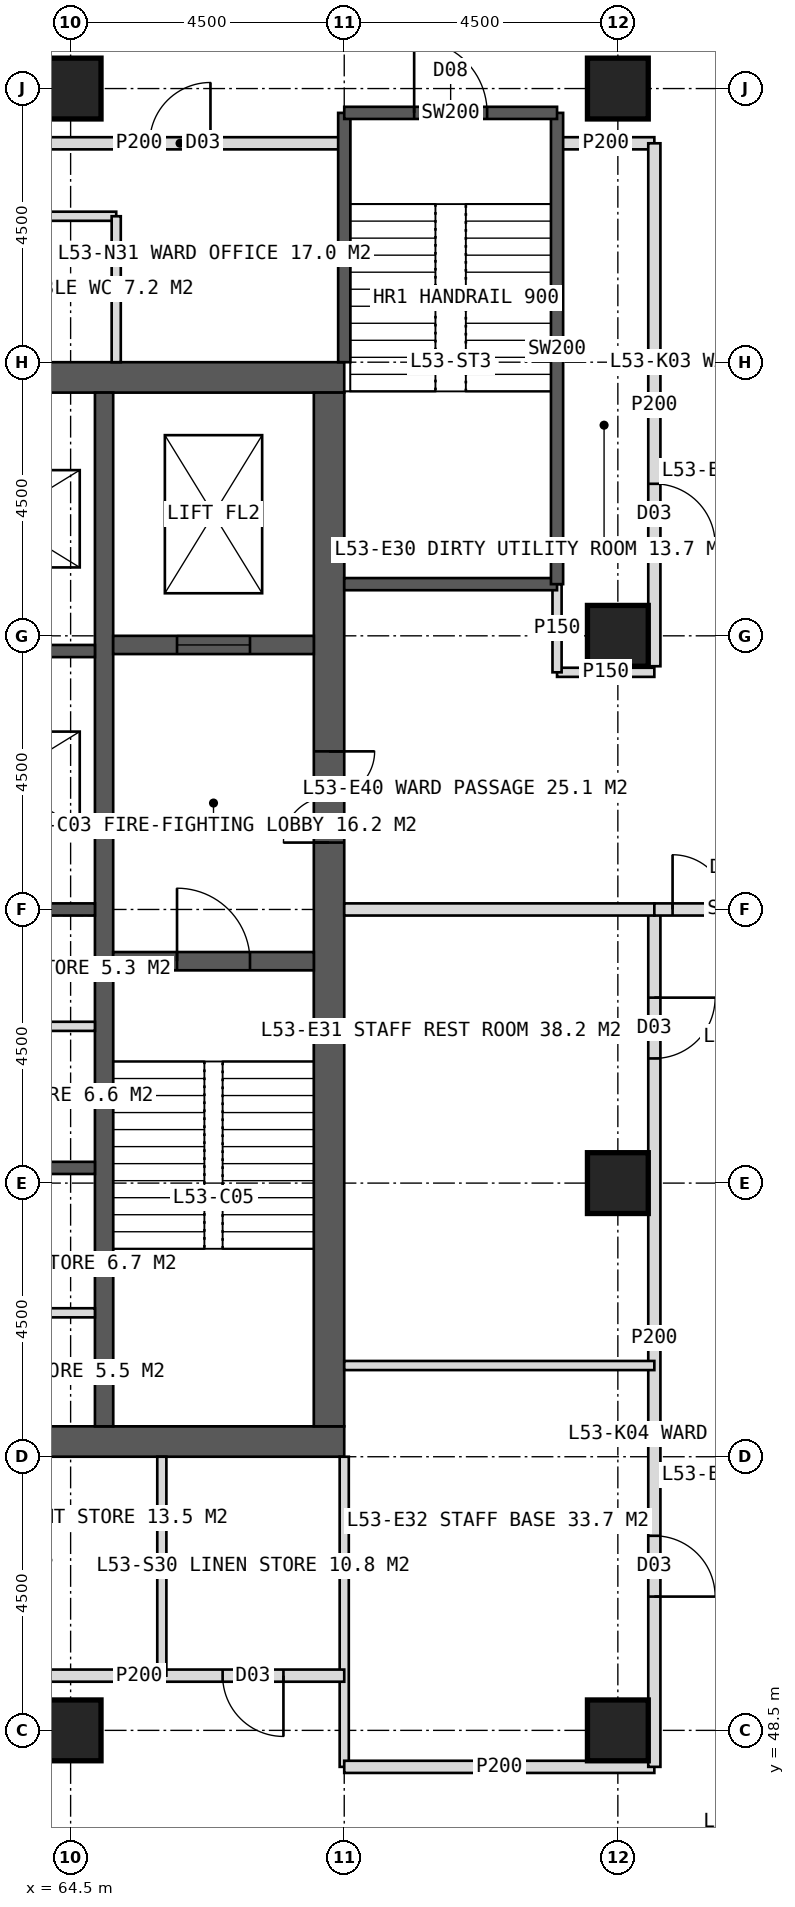
"""IFC4 building model, lengths in metres.
Left out: names, types, materials, properties, quantities, classifications, styles, units other than length and angle.
Written with IfcOpenShell. Run it as: python <this file> out.ifc"""

import sys

from ifc_helpers import new_model, si_unit, direction, frame, frame_2d, origin, origin_2d, place, context, subcontext, project, spatial, rectangle, hollow_rectangle, extrude, element, fill, save


model = new_model("IFC4")
c1 = context("Model", 3, precision=1e-05, world=origin(), true_north=direction((0.0, 1.0)))
c2 = subcontext(c1, "Body", "Model", "MODEL_VIEW")
j1 = project(units=[si_unit("LENGTHUNIT", "METRE"), si_unit("PLANEANGLEUNIT", "RADIAN")], contexts=[c1])
p1 = place(None, origin())
s1 = spatial("IfcSite", under=j1, at=p1, CompositionType="ELEMENT")
p2 = place(p1, origin())
s2 = spatial("IfcBuilding", under=s1, at=p2, CompositionType="ELEMENT")
p3 = place(p2, frame((0.0, 0.0, 221.0)))
s3 = spatial("IfcBuildingStorey", under=s2, at=p3, CompositionType="ELEMENT", Elevation=221.0)
p4 = place(p3, frame((51.0, 70.75, 0.0), z_axis=(0.0, 0.0, 1.0), x_axis=(1.0, 0.0, 0.0)))
e1 = element("IfcWall", 1, at=p4, inside=s3, PredefinedType="SHEAR", context=c2, shape_type="SweptSolid", body=[
    extrude(rectangle(XDim=18.0, YDim=0.5, at=frame_2d((9.0, 0.0))), origin(), (0.0, 0.0, 1.0), 4.0),
])
p5 = place(p4, frame((8.1, 0.0, 0.0)))
e2 = element("IfcOpeningElement", 2, at=p5, cuts=e1, PredefinedType="OPENING", context=c2, shape_type="SweptSolid", body=[
    extrude(rectangle(XDim=1.8, YDim=2.2, at=frame_2d((0.9, 1.1))), frame((0.0, 0.26, 0.0), z_axis=(0.0, -1.0, 0.0), x_axis=(1.0, 0.0, 0.0)), (0.0, 0.0, 1.0), 0.52),
])
p6 = place(p3, frame((51.0, 53.25, 0.0), z_axis=(0.0, 0.0, 1.0), x_axis=(1.0, 0.0, 0.0)))
e3 = element("IfcWall", 3, at=p6, inside=s3, PredefinedType="SHEAR", context=c2, shape_type="SweptSolid", body=[
    extrude(rectangle(XDim=18.0, YDim=0.5, at=frame_2d((9.0, 0.0))), origin(), (0.0, 0.0, 1.0), 4.0),
])
p7 = place(p6, frame((8.1, 0.0, 0.0)))
e4 = element("IfcOpeningElement", 4, at=p7, cuts=e3, PredefinedType="OPENING", context=c2, shape_type="SweptSolid", body=[
    extrude(rectangle(XDim=1.8, YDim=2.2, at=frame_2d((0.9, 1.1))), frame((0.0, 0.26, 0.0), z_axis=(0.0, -1.0, 0.0), x_axis=(1.0, 0.0, 0.0)), (0.0, 0.0, 1.0), 0.52),
])
p8 = place(p3, frame((68.75, 53.5, 0.0), z_axis=(0.0, 0.0, 1.0), x_axis=(0.0, 1.0, 0.0)))
e5 = element("IfcWall", 5, at=p8, inside=s3, PredefinedType="SHEAR", context=c2, shape_type="SweptSolid", body=[
    extrude(rectangle(XDim=17.0, YDim=0.5, at=frame_2d((8.5, 0.0))), origin(), (0.0, 0.0, 1.0), 4.0),
])
p9 = place(p8, frame((9.6, 0.0, 0.0)))
e6 = element("IfcOpeningElement", 6, at=p9, cuts=e5, PredefinedType="OPENING", context=c2, shape_type="SweptSolid", body=[
    extrude(rectangle(XDim=1.5, YDim=2.2, at=frame_2d((0.75, 1.1))), frame((0.0, 0.26, 0.0), z_axis=(0.0, -1.0, 0.0), x_axis=(1.0, 0.0, 0.0)), (0.0, 0.0, 1.0), 0.52),
])
p10 = place(p3, frame((65.05, 53.5, 0.0), z_axis=(0.0, 0.0, 1.0), x_axis=(0.0, 1.0, 0.0)))
e7 = element("IfcWall", 7, at=p10, inside=s3, PredefinedType="SHEAR", context=c2, shape_type="SweptSolid", body=[
    extrude(rectangle(XDim=17.0, YDim=0.3, at=frame_2d((8.5, 0.0))), origin(), (0.0, 0.0, 1.0), 4.0),
])
for number, where, z_axis, x_axis in (
    (8, (61.85, 57.75, 0.0), (0.0, 0.0, 1.0), (1.0, 0.0, 0.0)),
    (9, (61.85, 62.0, 0.0), (0.0, 0.0, 1.0), (1.0, 0.0, 0.0)),
    (10, (61.85, 66.25, 0.0), (0.0, 0.0, 1.0), (1.0, 0.0, 0.0)),
):
    element("IfcWall", number, at=place(p3, frame(where, z_axis=z_axis, x_axis=x_axis)), inside=s3, PredefinedType="SHEAR", context=c2, shape_type="SweptSolid", body=[
        extrude(rectangle(XDim=3.05, YDim=0.2, at=frame_2d((1.525, 0.0))), origin(), (0.0, 0.0, 1.0), 4.0),
    ])
p11 = place(p3, frame((65.2, 61.15, 0.0), z_axis=(0.0, 0.0, 1.0), x_axis=(1.0, 0.0, 0.0)))
e11 = element("IfcWall", 11, at=p11, inside=s3, PredefinedType="SHEAR", context=c2, shape_type="SweptSolid", body=[
    extrude(rectangle(XDim=3.3, YDim=0.3, at=frame_2d((1.65, 0.0))), origin(), (0.0, 0.0, 1.0), 4.0),
])
p12 = place(p11, frame((1.05, 0.0, 0.0)))
e12 = element("IfcOpeningElement", 12, at=p12, cuts=e11, PredefinedType="OPENING", context=c2, shape_type="SweptSolid", body=[
    extrude(rectangle(XDim=1.2, YDim=2.1, at=frame_2d((0.6, 1.05))), frame((0.0, 0.16, 0.0), z_axis=(0.0, -1.0, 0.0), x_axis=(1.0, 0.0, 0.0)), (0.0, 0.0, 1.0), 0.32),
])
p13 = place(p3, frame((65.2, 66.35, 0.0), z_axis=(0.0, 0.0, 1.0), x_axis=(1.0, 0.0, 0.0)))
e13 = element("IfcWall", 13, at=p13, inside=s3, PredefinedType="SHEAR", context=c2, shape_type="SweptSolid", body=[
    extrude(rectangle(XDim=3.3, YDim=0.3, at=frame_2d((1.65, 0.0))), origin(), (0.0, 0.0, 1.0), 4.0),
])
p14 = place(p13, frame((1.05, 0.0, 0.0)))
e14 = element("IfcOpeningElement", 14, at=p14, cuts=e13, PredefinedType="OPENING", context=c2, shape_type="SweptSolid", body=[
    extrude(rectangle(XDim=1.2, YDim=2.2, at=frame_2d((0.6, 1.1))), frame((0.0, 0.16, 0.0), z_axis=(0.0, -1.0, 0.0), x_axis=(1.0, 0.0, 0.0)), (0.0, 0.0, 1.0), 0.32),
])
for number, where, z_axis, x_axis in (
    (15, (73.5, 48.5, 0.0), (0.0, 0.0, 1.0), (1.0, 0.0, 0.0)),
    (16, (73.5, 75.5, 0.0), (0.0, 0.0, 1.0), (1.0, 0.0, 0.0)),
    (17, (64.5, 48.5, 0.0), (0.0, 0.0, 1.0), (1.0, 0.0, 0.0)),
    (18, (64.5, 75.5, 0.0), (0.0, 0.0, 1.0), (1.0, 0.0, 0.0)),
    (19, (73.5, 57.5, 0.0), (0.0, 0.0, 1.0), (1.0, 0.0, 0.0)),
    (20, (73.5, 66.5, 0.0), (0.0, 0.0, 1.0), (1.0, 0.0, 0.0)),
):
    element("IfcColumn", number, at=place(p3, frame(where, z_axis=z_axis, x_axis=x_axis)), inside=s3, PredefinedType="COLUMN", context=c2, shape_type="SweptSolid", body=[
        extrude(hollow_rectangle(XDim=1.0, YDim=1.0, WallThickness=0.1, at=origin_2d()), origin(), (0.0, 0.0, 1.0), 4.0),
    ])
p15 = place(p3, frame((62.25, 74.6, 0.0), z_axis=(0.0, 0.0, 1.0), x_axis=(1.0, 0.0, 0.0)))
e21 = element("IfcWall", 21, at=p15, inside=s3, PredefinedType="PARTITIONING", context=c2, shape_type="SweptSolid", body=[
    extrude(rectangle(XDim=6.75, YDim=0.2, at=frame_2d((3.375, 0.0))), origin(), (0.0, 0.0, 1.0), 3.75),
])
p16 = place(p15, frame((3.55, 0.0, 0.0)))
e22 = element("IfcOpeningElement", 22, at=p16, cuts=e21, PredefinedType="OPENING", context=c2, shape_type="SweptSolid", body=[
    extrude(rectangle(XDim=1.0, YDim=2.1, at=frame_2d((0.5, 1.05))), frame((0.0, 0.11, 0.0), z_axis=(0.0, -1.0, 0.0), x_axis=(1.0, 0.0, 0.0)), (0.0, 0.0, 1.0), 0.22),
])
p17 = place(p3, frame((72.5, 74.6, 0.0), z_axis=(0.0, 0.0, 1.0), x_axis=(1.0, 0.0, 0.0)))
e23 = element("IfcWall", 23, at=p17, inside=s3, PredefinedType="PARTITIONING", context=c2, shape_type="SweptSolid", body=[
    extrude(rectangle(XDim=1.6, YDim=0.2, at=frame_2d((0.8, 0.0))), origin(), (0.0, 0.0, 1.0), 3.75),
])
p18 = place(p3, frame((62.25, 73.4, 0.0), z_axis=(0.0, 0.0, 1.0), x_axis=(1.0, 0.0, 0.0)))
e24 = element("IfcWall", 24, at=p18, inside=s3, PredefinedType="PARTITIONING", context=c2, shape_type="SweptSolid", body=[
    extrude(rectangle(XDim=3.0, YDim=0.15, at=frame_2d((1.5, 0.0))), origin(), (0.0, 0.0, 1.0), 3.75),
])
p19 = place(p3, frame((65.25, 71.0, 0.0), z_axis=(0.0, 0.0, 1.0), x_axis=(0.0, 1.0, 0.0)))
e25 = element("IfcWall", 25, at=p19, inside=s3, PredefinedType="PARTITIONING", context=c2, shape_type="SweptSolid", body=[
    extrude(rectangle(XDim=2.4, YDim=0.15, at=frame_2d((1.2, 0.0))), origin(), (0.0, 0.0, 1.0), 3.75),
])
p20 = place(p3, frame((69.0, 53.0, 0.0), z_axis=(0.0, 0.0, 1.0), x_axis=(0.0, -1.0, 0.0)))
e26 = element("IfcWall", 26, at=p20, inside=s3, PredefinedType="PARTITIONING", context=c2, shape_type="SweptSolid", body=[
    extrude(rectangle(XDim=5.1, YDim=0.15, at=frame_2d((2.55, 0.0))), origin(), (0.0, 0.0, 1.0), 3.75),
])
p21 = place(p3, frame((74.1, 47.9, 0.0), z_axis=(0.0, 0.0, 1.0), x_axis=(-1.0, 0.0, 0.0)))
e27 = element("IfcWall", 27, at=p21, inside=s3, PredefinedType="PARTITIONING", context=c2, shape_type="SweptSolid", body=[
    extrude(rectangle(XDim=5.1, YDim=0.2, at=frame_2d((2.55, 0.0))), origin(), (0.0, 0.0, 1.0), 3.75),
])
p22 = place(p3, frame((69.0, 49.4, 0.0), z_axis=(0.0, 0.0, 1.0), x_axis=(-1.0, 0.0, 0.0)))
e28 = element("IfcWall", 28, at=p22, inside=s3, PredefinedType="PARTITIONING", context=c2, shape_type="SweptSolid", body=[
    extrude(rectangle(XDim=6.75, YDim=0.2, at=frame_2d((3.375, 0.0))), origin(), (0.0, 0.0, 1.0), 3.75),
])
p23 = place(p22, frame((1.0, 0.0, 0.0)))
e29 = element("IfcOpeningElement", 29, at=p23, cuts=e28, PredefinedType="OPENING", context=c2, shape_type="SweptSolid", body=[
    extrude(rectangle(XDim=1.0, YDim=2.1, at=frame_2d((0.5, 1.05))), frame((0.0, 0.11, 0.0), z_axis=(0.0, -1.0, 0.0), x_axis=(1.0, 0.0, 0.0)), (0.0, 0.0, 1.0), 0.22),
])
p24 = place(p22, frame((5.425, 0.0, 0.0)))
e30 = element("IfcOpeningElement", 30, at=p24, cuts=e28, PredefinedType="OPENING", context=c2, shape_type="SweptSolid", body=[
    extrude(rectangle(XDim=1.0, YDim=2.1, at=frame_2d((0.5, 1.05))), frame((0.0, 0.11, 0.0), z_axis=(0.0, -1.0, 0.0), x_axis=(1.0, 0.0, 0.0)), (0.0, 0.0, 1.0), 0.22),
])
p25 = place(p3, frame((66.0, 53.0, 0.0), z_axis=(0.0, 0.0, 1.0), x_axis=(0.0, -1.0, 0.0)))
e31 = element("IfcWall", 31, at=p25, inside=s3, PredefinedType="PARTITIONING", context=c2, shape_type="SweptSolid", body=[
    extrude(rectangle(XDim=3.6, YDim=0.15, at=frame_2d((1.8, 0.0))), origin(), (0.0, 0.0, 1.0), 3.75),
])
p26 = place(p3, frame((74.1, 74.6, 0.0), z_axis=(0.0, 0.0, 1.0), x_axis=(0.0, -1.0, 0.0)))
e32 = element("IfcWall", 32, at=p26, inside=s3, PredefinedType="PARTITIONING", context=c2, shape_type="SweptSolid", body=[
    extrude(rectangle(XDim=8.6, YDim=0.2, at=frame_2d((4.3, 0.0))), origin(), (0.0, 0.0, 1.0), 3.75),
])
p27 = place(p26, frame((5.6, 0.0, 0.0)))
e33 = element("IfcOpeningElement", 33, at=p27, cuts=e32, PredefinedType="OPENING", context=c2, shape_type="SweptSolid", body=[
    extrude(rectangle(XDim=1.0, YDim=2.1, at=frame_2d((0.5, 1.05))), frame((0.0, 0.11, 0.0), z_axis=(0.0, -1.0, 0.0), x_axis=(1.0, 0.0, 0.0)), (0.0, 0.0, 1.0), 0.22),
])
p28 = place(p3, frame((74.1, 62.0, 0.0), z_axis=(0.0, 0.0, 1.0), x_axis=(0.0, -1.0, 0.0)))
e34 = element("IfcWall", 34, at=p28, inside=s3, PredefinedType="PARTITIONING", context=c2, shape_type="SweptSolid", body=[
    extrude(rectangle(XDim=14.1, YDim=0.2, at=frame_2d((7.05, 0.0))), origin(), (0.0, 0.0, 1.0), 3.75),
])
p29 = place(p28, frame((1.45, 0.0, 0.0)))
e35 = element("IfcOpeningElement", 35, at=p29, cuts=e34, PredefinedType="OPENING", context=c2, shape_type="SweptSolid", body=[
    extrude(rectangle(XDim=1.0, YDim=2.1, at=frame_2d((0.5, 1.05))), frame((0.0, 0.11, 0.0), z_axis=(0.0, -1.0, 0.0), x_axis=(1.0, 0.0, 0.0)), (0.0, 0.0, 1.0), 0.22),
])
p30 = place(p28, frame((10.3, 0.0, 0.0)))
e36 = element("IfcOpeningElement", 36, at=p30, cuts=e34, PredefinedType="OPENING", context=c2, shape_type="SweptSolid", body=[
    extrude(rectangle(XDim=1.0, YDim=2.1, at=frame_2d((0.5, 1.05))), frame((0.0, 0.11, 0.0), z_axis=(0.0, -1.0, 0.0), x_axis=(1.0, 0.0, 0.0)), (0.0, 0.0, 1.0), 0.22),
])
p31 = place(p3, frame((72.5, 65.9, 0.0), z_axis=(0.0, 0.0, 1.0), x_axis=(1.0, 0.0, 0.0)))
e37 = element("IfcWall", 37, at=p31, inside=s3, PredefinedType="PARTITIONING", context=c2, shape_type="SweptSolid", body=[
    extrude(rectangle(XDim=1.6, YDim=0.15, at=frame_2d((0.8, 0.0))), origin(), (0.0, 0.0, 1.0), 3.75),
])
p32 = place(p3, frame((69.0, 62.0, 0.0), z_axis=(0.0, 0.0, 1.0), x_axis=(1.0, 0.0, 0.0)))
e38 = element("IfcWall", 38, at=p32, inside=s3, PredefinedType="SOLIDWALL", context=c2, shape_type="SweptSolid", body=[
    extrude(rectangle(XDim=5.1, YDim=0.2, at=frame_2d((2.55, 0.0))), origin(), (0.0, 0.0, 1.0), 2.95),
])
p33 = place(p3, frame((69.0, 54.5, 0.0), z_axis=(0.0, 0.0, 1.0), x_axis=(1.0, 0.0, 0.0)))
e39 = element("IfcWall", 39, at=p33, inside=s3, PredefinedType="PARTITIONING", context=c2, shape_type="SweptSolid", body=[
    extrude(rectangle(XDim=5.1, YDim=0.15, at=frame_2d((2.55, 0.0))), origin(), (0.0, 0.0, 1.0), 3.75),
])
p34 = place(p3, frame((74.1, 62.0, 0.0), z_axis=(0.0, 0.0, 1.0), x_axis=(1.0, 0.0, 0.0)))
e40 = element("IfcWall", 40, at=p34, inside=s3, PredefinedType="SOLIDWALL", context=c2, shape_type="SweptSolid", body=[
    extrude(rectangle(XDim=2.7, YDim=0.2, at=frame_2d((1.35, 0.0))), origin(), (0.0, 0.0, 1.0), 2.95),
])
p35 = place(p34, frame((0.3, 0.0, 0.0)))
e41 = element("IfcOpeningElement", 41, at=p35, cuts=e40, PredefinedType="OPENING", context=c2, shape_type="SweptSolid", body=[
    extrude(rectangle(XDim=1.8, YDim=2.2, at=frame_2d((0.9, 1.1))), frame((0.0, 0.11, 0.0), z_axis=(0.0, -1.0, 0.0), x_axis=(1.0, 0.0, 0.0)), (0.0, 0.0, 1.0), 0.22),
])
for number, where, z_axis, x_axis in (
    (42, (61.85, 55.367, 0.0), (0.0, 0.0, 1.0), (1.0, 0.0, 0.0)),
    (43, (61.85, 60.078, 0.0), (0.0, 0.0, 1.0), (1.0, 0.0, 0.0)),
):
    element("IfcWall", number, at=place(p3, frame(where, z_axis=z_axis, x_axis=x_axis)), inside=s3, PredefinedType="PARTITIONING", context=c2, shape_type="SweptSolid", body=[
        extrude(rectangle(XDim=3.05, YDim=0.15, at=frame_2d((1.525, 0.0))), origin(), (0.0, 0.0, 1.0), 3.75),
    ])
p36 = place(p3, frame((72.5, 65.9, 0.0), z_axis=(0.0, 0.0, 1.0), x_axis=(0.0, 1.0, 0.0)))
e44 = element("IfcWall", 44, at=p36, inside=s3, PredefinedType="PARTITIONING", context=c2, shape_type="SweptSolid", body=[
    extrude(rectangle(XDim=1.45, YDim=0.15, at=frame_2d((0.725, 0.0))), origin(), (0.0, 0.0, 1.0), 3.75),
])
p37 = place(p3, frame((69.0, 71.0, 0.0), z_axis=(0.0, 0.0, 1.0), x_axis=(0.0, 1.0, 0.0)))
e45 = element("IfcWall", 45, at=p37, inside=s3, PredefinedType="SOLIDWALL", context=c2, shape_type="SweptSolid", body=[
    extrude(rectangle(XDim=4.1, YDim=0.2, at=frame_2d((2.05, 0.0))), origin(), (0.0, 0.0, 1.0), 3.75),
])
p38 = place(p3, frame((69.0, 67.35, 0.0), z_axis=(0.0, 0.0, 1.0), x_axis=(1.0, 0.0, 0.0)))
e46 = element("IfcWall", 46, at=p38, inside=s3, PredefinedType="SOLIDWALL", context=c2, shape_type="SweptSolid", body=[
    extrude(rectangle(XDim=3.5, YDim=0.2, at=frame_2d((1.75, 0.0))), origin(), (0.0, 0.0, 1.0), 3.75),
])
p39 = place(p3, frame((72.5, 67.35, 0.0), z_axis=(0.0, 0.0, 1.0), x_axis=(0.0, 1.0, 0.0)))
e47 = element("IfcWall", 47, at=p39, inside=s3, PredefinedType="SOLIDWALL", context=c2, shape_type="SweptSolid", body=[
    extrude(rectangle(XDim=7.75, YDim=0.2, at=frame_2d((3.875, 0.0))), origin(), (0.0, 0.0, 1.0), 3.75),
])
p40 = place(p3, frame((69.0, 75.1, 0.0), z_axis=(0.0, 0.0, 1.0), x_axis=(1.0, 0.0, 0.0)))
e48 = element("IfcWall", 48, at=p40, inside=s3, PredefinedType="SOLIDWALL", context=c2, shape_type="SweptSolid", body=[
    extrude(rectangle(XDim=3.5, YDim=0.2, at=frame_2d((1.75, 0.0))), origin(), (0.0, 0.0, 1.0), 3.75),
])
p41 = place(p40, frame((1.15, 0.0, 0.0)))
e49 = element("IfcOpeningElement", 49, at=p41, cuts=e48, PredefinedType="OPENING", context=c2, shape_type="SweptSolid", body=[
    extrude(rectangle(XDim=1.2, YDim=2.1, at=frame_2d((0.6, 1.05))), frame((0.0, 0.11, 0.0), z_axis=(0.0, -1.0, 0.0), x_axis=(1.0, 0.0, 0.0)), (0.0, 0.0, 1.0), 0.22),
])
p42 = place(p16, origin())
e50 = element("IfcDoor", 50, at=p42, inside=s3, OperationType="SINGLE_SWING_RIGHT", PredefinedType="DOOR", context=c2, shape_type="SweptSolid", body=[
    extrude(rectangle(XDim=1.0, YDim=2.1, at=frame_2d((0.5, 1.05))), frame((0.0, 0.025, 0.0), z_axis=(0.0, -1.0, 0.0), x_axis=(1.0, 0.0, 0.0)), (0.0, 0.0, 1.0), 0.05),
])
fill(e22, e50)
p43 = place(p23, origin())
e51 = element("IfcDoor", 51, at=p43, inside=s3, OperationType="SINGLE_SWING_LEFT", PredefinedType="DOOR", context=c2, shape_type="SweptSolid", body=[
    extrude(rectangle(XDim=1.0, YDim=2.1, at=frame_2d((0.5, 1.05))), frame((0.0, 0.025, 0.0), z_axis=(0.0, -1.0, 0.0), x_axis=(1.0, 0.0, 0.0)), (0.0, 0.0, 1.0), 0.05),
])
fill(e29, e51)
p44 = place(p27, origin())
e52 = element("IfcDoor", 52, at=p44, inside=s3, OperationType="SINGLE_SWING_RIGHT", PredefinedType="DOOR", context=c2, shape_type="SweptSolid", body=[
    extrude(rectangle(XDim=1.0, YDim=2.1, at=frame_2d((0.5, 1.05))), frame((0.0, 0.025, 0.0), z_axis=(0.0, -1.0, 0.0), x_axis=(1.0, 0.0, 0.0)), (0.0, 0.0, 1.0), 0.05),
])
fill(e33, e52)
p45 = place(p29, origin())
e53 = element("IfcDoor", 53, at=p45, inside=s3, OperationType="SINGLE_SWING_LEFT", PredefinedType="DOOR", context=c2, shape_type="SweptSolid", body=[
    extrude(rectangle(XDim=1.0, YDim=2.1, at=frame_2d((0.5, 1.05))), frame((0.0, 0.025, 0.0), z_axis=(0.0, -1.0, 0.0), x_axis=(1.0, 0.0, 0.0)), (0.0, 0.0, 1.0), 0.05),
])
fill(e35, e53)
p46 = place(p30, origin())
e54 = element("IfcDoor", 54, at=p46, inside=s3, OperationType="SINGLE_SWING_RIGHT", PredefinedType="DOOR", context=c2, shape_type="SweptSolid", body=[
    extrude(rectangle(XDim=1.0, YDim=2.1, at=frame_2d((0.5, 1.05))), frame((0.0, 0.025, 0.0), z_axis=(0.0, -1.0, 0.0), x_axis=(1.0, 0.0, 0.0)), (0.0, 0.0, 1.0), 0.05),
])
fill(e36, e54)
p47 = place(p35, origin())
e55 = element("IfcDoor", 55, at=p47, inside=s3, OperationType="DOUBLE_DOOR_DOUBLE_SWING", PredefinedType="DOOR", context=c2, shape_type="SweptSolid", body=[
    extrude(rectangle(XDim=1.8, YDim=2.2, at=frame_2d((0.9, 1.1))), frame((0.0, 0.025, 0.0), z_axis=(0.0, -1.0, 0.0), x_axis=(1.0, 0.0, 0.0)), (0.0, 0.0, 1.0), 0.05),
])
fill(e41, e55)
p48 = place(p9, origin())
e56 = element("IfcDoor", 56, at=p48, inside=s3, OperationType="DOUBLE_DOOR_SINGLE_SWING", PredefinedType="DOOR", context=c2, shape_type="SweptSolid", body=[
    extrude(rectangle(XDim=1.5, YDim=2.2, at=frame_2d((0.75, 1.1))), frame((0.0, 0.025, 0.0), z_axis=(0.0, -1.0, 0.0), x_axis=(1.0, 0.0, 0.0)), (0.0, 0.0, 1.0), 0.05),
])
fill(e6, e56)
p49 = place(p12, origin())
e57 = element("IfcDoor", 57, at=p49, inside=s3, OperationType="SINGLE_SWING_LEFT", PredefinedType="DOOR", context=c2, shape_type="SweptSolid", body=[
    extrude(rectangle(XDim=1.2, YDim=2.1, at=frame_2d((0.6, 1.05))), frame((0.0, 0.025, 0.0), z_axis=(0.0, -1.0, 0.0), x_axis=(1.0, 0.0, 0.0)), (0.0, 0.0, 1.0), 0.05),
])
fill(e12, e57)
p50 = place(p14, origin())
e58 = element("IfcDoor", 58, at=p50, inside=s3, OperationType="SLIDING_TO_LEFT", PredefinedType="DOOR", context=c2, shape_type="SweptSolid", body=[
    extrude(rectangle(XDim=1.2, YDim=2.2, at=frame_2d((0.6, 1.1))), frame((0.0, 0.025, 0.0), z_axis=(0.0, -1.0, 0.0), x_axis=(1.0, 0.0, 0.0)), (0.0, 0.0, 1.0), 0.05),
])
fill(e14, e58)
p51 = place(p41, origin())
e59 = element("IfcDoor", 59, at=p51, inside=s3, OperationType="SINGLE_SWING_LEFT", PredefinedType="DOOR", context=c2, shape_type="SweptSolid", body=[
    extrude(rectangle(XDim=1.2, YDim=2.1, at=frame_2d((0.6, 1.05))), frame((0.0, 0.025, 0.0), z_axis=(0.0, -1.0, 0.0), x_axis=(1.0, 0.0, 0.0)), (0.0, 0.0, 1.0), 0.05),
])
fill(e49, e59)
save(model, sys.argv[1])
